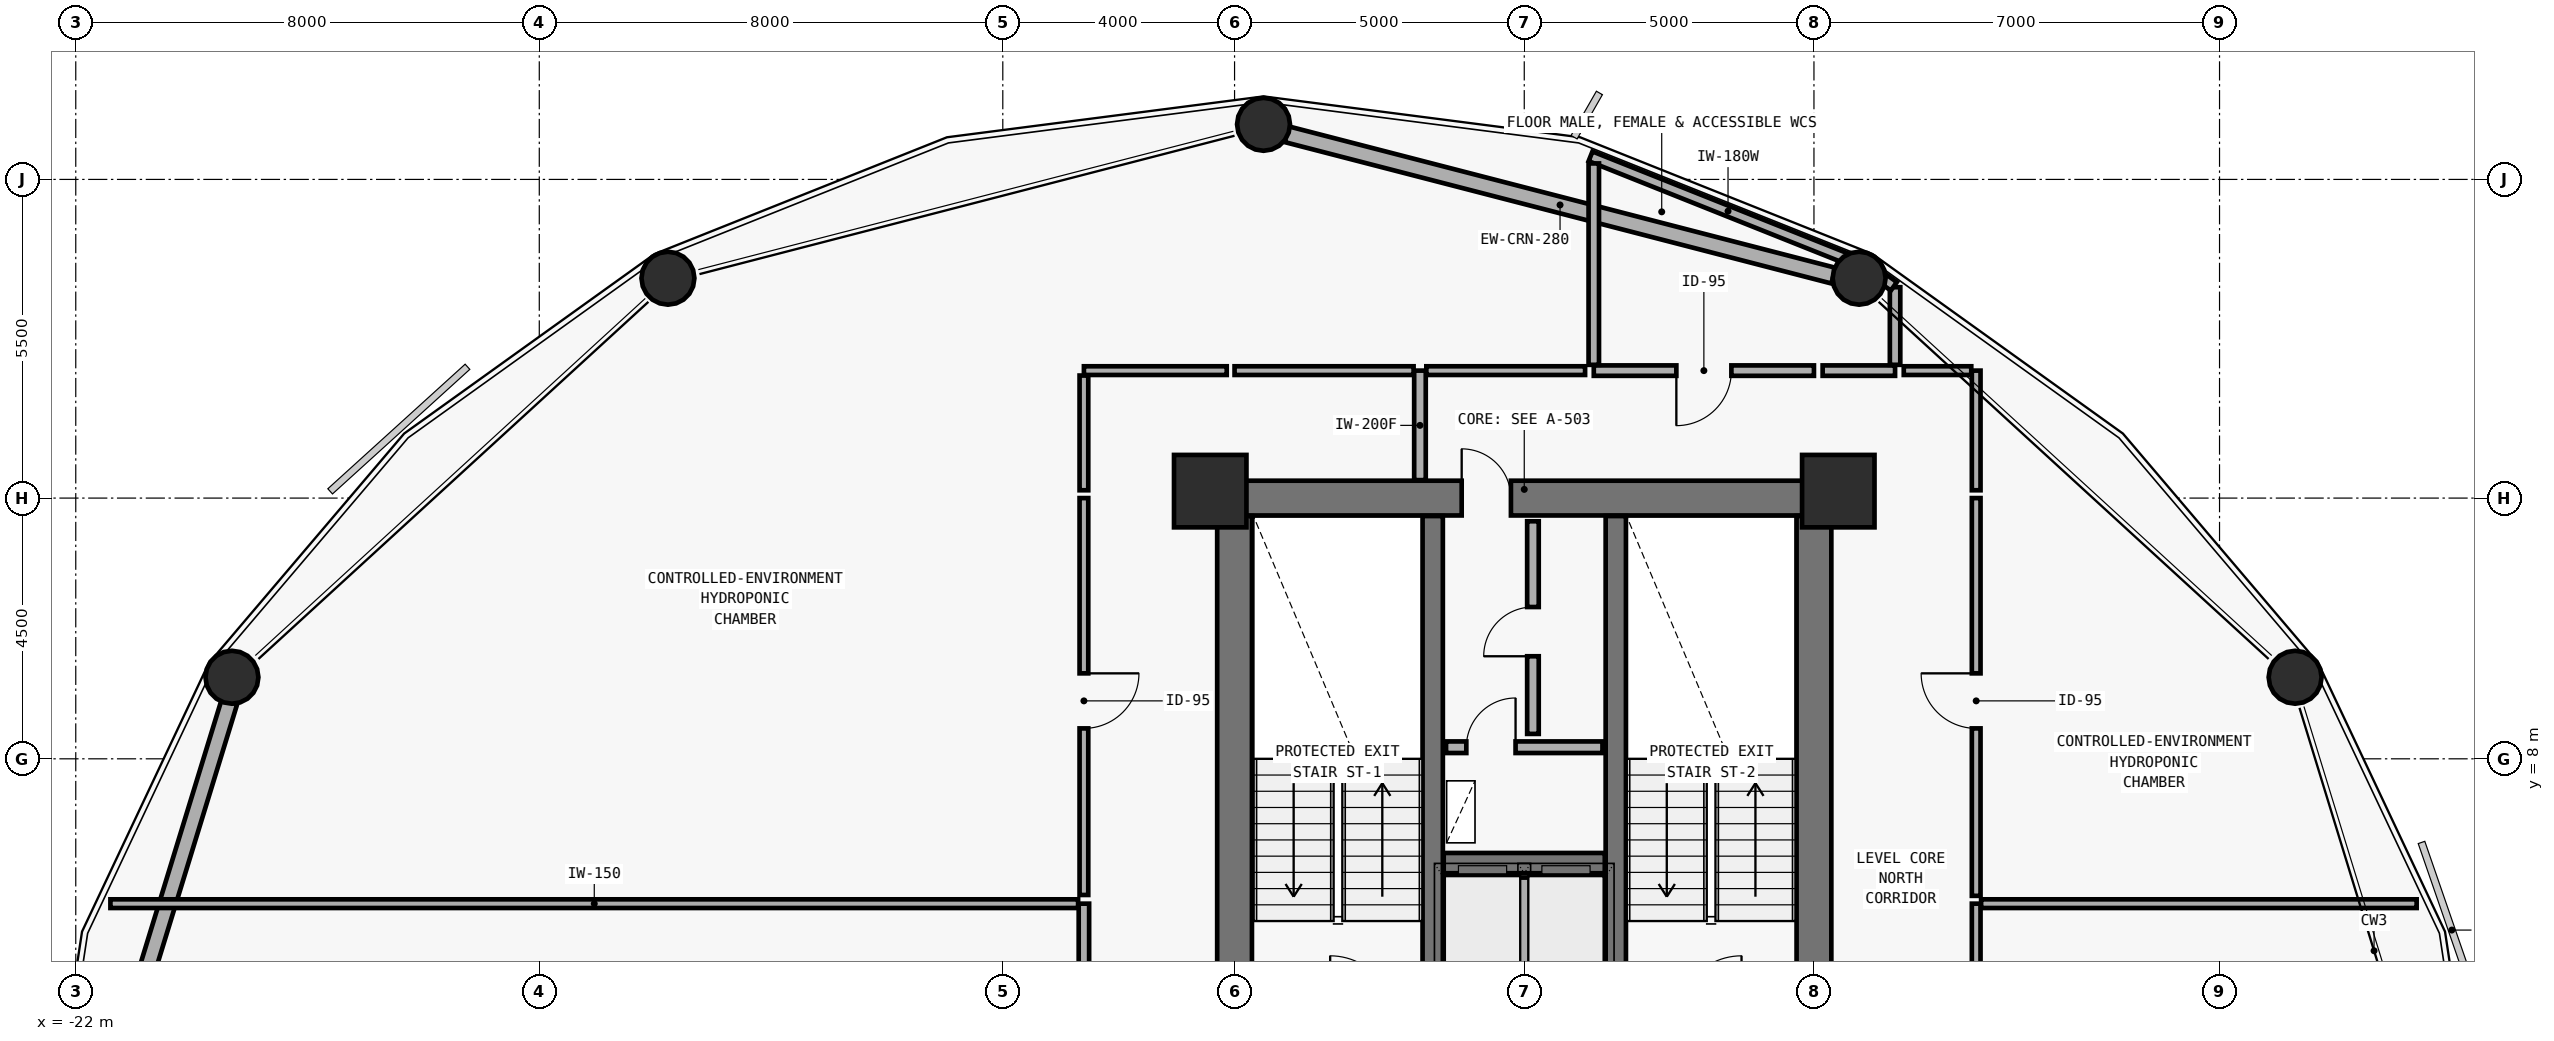
"""IFC4 building model, lengths in metres.
Left out: names, types, materials, properties, quantities, classifications, styles, units other than length and angle.
Written with IfcOpenShell. Run it as: python <this file> out.ifc"""

import sys

from ifc_helpers import new_model, si_unit, direction, frame, frame_2d, origin, origin_2d, place, context, subcontext, project, spatial, rectangle, hollow_circle, extrude, element, fill, save


model = new_model("IFC4")
c1 = context("Model", 3, precision=1e-05, world=origin(), true_north=direction((0.0, 1.0)))
c2 = subcontext(c1, "Body", "Model", "MODEL_VIEW")
j1 = project(units=[si_unit("LENGTHUNIT", "METRE"), si_unit("PLANEANGLEUNIT", "RADIAN")], contexts=[c1])
p1 = place(None, origin())
s1 = spatial("IfcSite", under=j1, at=p1, CompositionType="ELEMENT")
p2 = place(p1, origin())
s2 = spatial("IfcBuilding", under=s1, at=p2, CompositionType="ELEMENT")
p3 = place(p2, frame((0.0, 0.0, 39.3)))
s3 = spatial("IfcBuildingStorey", under=s2, at=p3, CompositionType="ELEMENT", Elevation=39.3)
p4 = place(p3, frame((-2.0, 12.5, 0.0), z_axis=(0.0, 0.0, 1.0), x_axis=(1.0, 0.0, 0.0)))
e1 = element("IfcWall", 1, at=p4, inside=s3, PredefinedType="SHEAR", context=c2, shape_type="SweptSolid", body=[
    extrude(rectangle(XDim=10.0, YDim=0.6, at=frame_2d((5.0, 0.0))), origin(), (0.0, 0.0, 1.0), 3.892),
])
p5 = place(p4, frame((3.92, 0.0, 0.0)))
e2 = element("IfcOpeningElement", 2, at=p5, cuts=e1, PredefinedType="OPENING", context=c2, shape_type="SweptSolid", body=[
    extrude(rectangle(XDim=0.85, YDim=2.1, at=frame_2d((0.425, 1.05))), frame((0.0, 0.31, 0.0), z_axis=(0.0, -1.0, 0.0), x_axis=(1.0, 0.0, 0.0)), (0.0, 0.0, 1.0), 0.62),
])
for number, where, z_axis, x_axis in (
    (3, (-2.0, 3.81, 0.0), (0.0, 0.0, 1.0), (0.0, 1.0, 0.0)),
    (4, (8.0, 3.81, 0.0), (0.0, 0.0, 1.0), (0.0, 1.0, 0.0)),
):
    element("IfcWall", number, at=place(p3, frame(where, z_axis=z_axis, x_axis=x_axis)), inside=s3, PredefinedType="SHEAR", context=c2, shape_type="SweptSolid", body=[
        extrude(rectangle(XDim=8.38, YDim=0.6, at=frame_2d((4.19, 0.0))), origin(), (0.0, 0.0, 1.0), 3.892),
    ])
for number, where, z_axis, x_axis in (
    (5, (1.42, 3.81, 0.0), (0.0, 0.0, 1.0), (0.0, 1.0, 0.0)),
    (6, (4.58, 3.81, 0.0), (0.0, 0.0, 1.0), (0.0, 1.0, 0.0)),
):
    element("IfcWall", number, at=place(p3, frame(where, z_axis=z_axis, x_axis=x_axis)), inside=s3, PredefinedType="SHEAR", context=c2, shape_type="SweptSolid", body=[
        extrude(rectangle(XDim=8.38, YDim=0.35, at=frame_2d((4.19, 0.0))), origin(), (0.0, 0.0, 1.0), 3.892),
    ])
p6 = place(p3, frame((1.61, 6.2, 0.0), z_axis=(0.0, 0.0, 1.0), x_axis=(1.0, 0.0, 0.0)))
e7 = element("IfcWall", 7, at=p6, inside=s3, PredefinedType="SHEAR", context=c2, shape_type="SweptSolid", body=[
    extrude(rectangle(XDim=2.78, YDim=0.35, at=frame_2d((1.39, 0.0))), origin(), (0.0, 0.0, 1.0), 3.892),
])
for number, where, z_axis, x_axis in (
    (8, (-2.42, 12.62, 0.0), (0.0, 0.0, 1.0), (1.0, 0.0, 0.0)),
    (9, (8.42, 12.62, 0.0), (0.0, 0.0, 1.0), (1.0, 0.0, 0.0)),
):
    element("IfcColumn", number, at=place(p3, frame(where, z_axis=z_axis, x_axis=x_axis)), inside=s3, PredefinedType="COLUMN", context=c2, shape_type="SweptSolid", body=[
        extrude(rectangle(XDim=1.25, YDim=1.25, at=origin_2d()), origin(), (0.0, 0.0, 1.0), 3.875),
    ])
p7 = place(p3, frame((16.229, 9.374, 0.0), z_axis=(0.039278153326, 0.017498920873, 0.999075079481), x_axis=(-0.406953237239, 0.913448992939, 0.0)))
e10 = element("IfcColumn", 10, at=p7, inside=s3, PredefinedType="COLUMN", context=c2, shape_type="SweptSolid", body=[
    extrude(hollow_circle(Radius=0.457, WallThickness=0.032, at=origin_2d()), origin(), (0.0, 0.0, 1.0), 3.879),
])
p8 = place(p3, frame((8.736, 16.236, 0.0), z_axis=(0.022665133029, 0.030409053481, 0.999280531788), x_axis=(-0.801789249334, 0.597606893913, 0.0)))
e11 = element("IfcColumn", 11, at=p8, inside=s3, PredefinedType="COLUMN", context=c2, shape_type="SweptSolid", body=[
    extrude(hollow_circle(Radius=0.457, WallThickness=0.032, at=origin_2d()), origin(), (0.0, 0.0, 1.0), 3.878),
])
p9 = place(p3, frame((-1.5, 18.883, 0.0), z_axis=(0.0, 0.03507165661, 0.999384800216), x_axis=(-1.0, 0.0, 0.0)))
e12 = element("IfcColumn", 12, at=p9, inside=s3, PredefinedType="COLUMN", context=c2, shape_type="SweptSolid", body=[
    extrude(hollow_circle(Radius=0.457, WallThickness=0.032, at=origin_2d()), origin(), (0.0, 0.0, 1.0), 3.877),
])
p10 = place(p3, frame((-11.736, 16.236, 0.0), z_axis=(-0.022665133029, 0.030409053481, 0.999280531788), x_axis=(-0.801789249334, -0.597606893913, 0.0)))
e13 = element("IfcColumn", 13, at=p10, inside=s3, PredefinedType="COLUMN", context=c2, shape_type="SweptSolid", body=[
    extrude(hollow_circle(Radius=0.457, WallThickness=0.032, at=origin_2d()), origin(), (0.0, 0.0, 1.0), 3.878),
])
p11 = place(p3, frame((-19.229, 9.374, 0.0), z_axis=(-0.039278153326, 0.017498920873, 0.999075079481), x_axis=(-0.406953237239, -0.913448992939, 0.0)))
e14 = element("IfcColumn", 14, at=p11, inside=s3, PredefinedType="COLUMN", context=c2, shape_type="SweptSolid", body=[
    extrude(hollow_circle(Radius=0.457, WallThickness=0.032, at=origin_2d()), origin(), (0.0, 0.0, 1.0), 3.879),
])
p12 = place(p3, frame((-1.101, 18.78, 0.0), z_axis=(0.0, 0.0, 1.0), x_axis=(0.968156017529, -0.250347609779, 0.0)))
e15 = element("IfcWall", 15, at=p12, inside=s3, PredefinedType="SOLIDWALL", context=c2, shape_type="SweptSolid", body=[
    extrude(rectangle(XDim=9.748, YDim=0.28, at=frame_2d((4.874, 0.0))), origin(), (0.0, 0.0, 1.0), 3.06),
])
p13 = place(p3, frame((-21.985, 0.394, 0.0), z_axis=(0.0, 0.0, 1.0), x_axis=(0.293459272164, 0.955971576764, 0.0)))
e16 = element("IfcWall", 16, at=p13, inside=s3, PredefinedType="SOLIDWALL", context=c2, shape_type="SweptSolid", body=[
    extrude(rectangle(XDim=8.982, YDim=0.28, at=frame_2d((4.491, 0.0))), origin(), (0.0, 0.0, 1.0), 3.06),
])
p14 = place(p3, frame((3.0, 3.92, 0.0), z_axis=(0.0, 0.0, 1.0), x_axis=(0.0, 1.0, 0.0)))
e17 = element("IfcWall", 17, at=p14, inside=s3, PredefinedType="SOLIDWALL", context=c2, shape_type="SweptSolid", body=[
    extrude(rectangle(XDim=2.03, YDim=0.2, at=frame_2d((1.015, 0.0))), origin(), (0.0, 0.0, 1.0), 3.64),
])
p15 = place(p3, frame((1.65, 8.2, 0.0), z_axis=(0.0, 0.0, 1.0), x_axis=(1.0, 0.0, 0.0)))
e18 = element("IfcWall", 18, at=p15, inside=s3, PredefinedType="MOVABLE", context=c2, shape_type="SweptSolid", body=[
    extrude(rectangle(XDim=2.7, YDim=0.2, at=frame_2d((1.35, 0.0))), origin(), (0.0, 0.0, 1.0), 3.64),
])
p16 = place(p15, frame((0.35, 0.0, 0.0)))
e19 = element("IfcOpeningElement", 19, at=p16, cuts=e18, PredefinedType="OPENING", context=c2, shape_type="SweptSolid", body=[
    extrude(rectangle(XDim=0.85, YDim=2.1, at=frame_2d((0.425, 1.05))), frame((0.0, 0.11, 0.0), z_axis=(0.0, -1.0, 0.0), x_axis=(1.0, 0.0, 0.0)), (0.0, 0.0, 1.0), 0.22),
])
p17 = place(p3, frame((3.15, 8.43, 0.0), z_axis=(0.0, 0.0, 1.0), x_axis=(0.0, 1.0, 0.0)))
e20 = element("IfcWall", 20, at=p17, inside=s3, PredefinedType="MOVABLE", context=c2, shape_type="SweptSolid", body=[
    extrude(rectangle(XDim=3.67, YDim=0.2, at=frame_2d((1.835, 0.0))), origin(), (0.0, 0.0, 1.0), 3.64),
])
p18 = place(p17, frame((1.34, 0.0, 0.0)))
e21 = element("IfcOpeningElement", 21, at=p18, cuts=e20, PredefinedType="OPENING", context=c2, shape_type="SweptSolid", body=[
    extrude(rectangle(XDim=0.85, YDim=2.1, at=frame_2d((0.425, 1.05))), frame((0.0, 0.11, 0.0), z_axis=(0.0, -1.0, 0.0), x_axis=(1.0, 0.0, 0.0)), (0.0, 0.0, 1.0), 0.22),
])
p19 = place(p3, frame((8.0, 14.7, 0.0), z_axis=(0.0, 0.0, 1.0), x_axis=(-1.0, 0.0, 0.0)))
e22 = element("IfcWall", 22, at=p19, inside=s3, PredefinedType="PLUMBINGWALL", context=c2, shape_type="SweptSolid", body=[
    extrude(rectangle(XDim=3.8, YDim=0.18, at=frame_2d((1.9, 0.0))), origin(), (0.0, 0.0, 1.0), 3.122),
])
p20 = place(p19, frame((1.425, 0.0, 0.0)))
e23 = element("IfcOpeningElement", 23, at=p20, cuts=e22, PredefinedType="OPENING", context=c2, shape_type="SweptSolid", body=[
    extrude(rectangle(XDim=0.95, YDim=2.1, at=frame_2d((0.475, 1.05))), frame((0.0, 0.1, 0.0), z_axis=(0.0, -1.0, 0.0), x_axis=(1.0, 0.0, 0.0)), (0.0, 0.0, 1.0), 0.2),
])
p21 = place(p3, frame((-4.6, 5.5, 0.0), z_axis=(0.0, 0.0, 1.0), x_axis=(0.0, -1.0, 0.0)))
e24 = element("IfcWall", 24, at=p21, inside=s3, PredefinedType="PLUMBINGWALL", context=c2, shape_type="SweptSolid", body=[
    extrude(rectangle(XDim=12.1, YDim=0.18, at=frame_2d((6.05, 0.0))), origin(), (0.0, 0.0, 1.0), 3.64),
])
p22 = place(p21, frame((5.575, 0.0, 0.0)))
e25 = element("IfcOpeningElement", 25, at=p22, cuts=e24, PredefinedType="OPENING", context=c2, shape_type="SweptSolid", body=[
    extrude(rectangle(XDim=0.95, YDim=2.1, at=frame_2d((0.475, 1.05))), frame((0.0, 0.1, 0.0), z_axis=(0.0, -1.0, 0.0), x_axis=(1.0, 0.0, 0.0)), (0.0, 0.0, 1.0), 0.2),
])
p23 = place(p3, frame((10.8, -1.69, 0.0), z_axis=(0.0, 0.0, 1.0), x_axis=(0.0, 1.0, 0.0)))
e26 = element("IfcWall", 26, at=p23, inside=s3, PredefinedType="PARTITIONING", context=c2, shape_type="SweptSolid", body=[
    extrude(rectangle(XDim=7.19, YDim=0.15, at=frame_2d((3.595, 0.0))), origin(), (0.0, 0.0, 1.0), 3.64),
])
p24 = place(p23, frame((3.065, 0.0, 0.0)))
e27 = element("IfcOpeningElement", 27, at=p24, cuts=e26, PredefinedType="OPENING", context=c2, shape_type="SweptSolid", body=[
    extrude(rectangle(XDim=0.95, YDim=2.1, at=frame_2d((0.475, 1.05))), frame((0.0, 0.085, 0.0), z_axis=(0.0, -1.0, 0.0), x_axis=(1.0, 0.0, 0.0)), (0.0, 0.0, 1.0), 0.17),
])
p25 = place(p3, frame((-4.6, 12.5, 0.0), z_axis=(0.0, 0.0, 1.0), x_axis=(0.0, -1.0, 0.0)))
e28 = element("IfcWall", 28, at=p25, inside=s3, PredefinedType="PARTITIONING", context=c2, shape_type="SweptSolid", body=[
    extrude(rectangle(XDim=6.85, YDim=0.15, at=frame_2d((3.425, 0.0))), origin(), (0.0, 0.0, 1.0), 3.64),
])
p26 = place(p25, frame((3.025, 0.0, 0.0)))
e29 = element("IfcOpeningElement", 29, at=p26, cuts=e28, PredefinedType="OPENING", context=c2, shape_type="SweptSolid", body=[
    extrude(rectangle(XDim=0.95, YDim=2.1, at=frame_2d((0.475, 1.05))), frame((0.0, 0.085, 0.0), z_axis=(0.0, -1.0, 0.0), x_axis=(1.0, 0.0, 0.0)), (0.0, 0.0, 1.0), 0.17),
])
p27 = place(p3, frame((10.8, 5.635, 0.0), z_axis=(0.0, 0.0, 1.0), x_axis=(0.0, 1.0, 0.0)))
e30 = element("IfcWall", 30, at=p27, inside=s3, PredefinedType="PARTITIONING", context=c2, shape_type="SweptSolid", body=[
    extrude(rectangle(XDim=6.865, YDim=0.15, at=frame_2d((3.433, 0.0))), origin(), (0.0, 0.0, 1.0), 3.64),
])
p28 = place(p27, frame((2.89, 0.0, 0.0)))
e31 = element("IfcOpeningElement", 31, at=p28, cuts=e30, PredefinedType="OPENING", context=c2, shape_type="SweptSolid", body=[
    extrude(rectangle(XDim=0.95, YDim=2.1, at=frame_2d((0.475, 1.05))), frame((0.0, 0.085, 0.0), z_axis=(0.0, -1.0, 0.0), x_axis=(1.0, 0.0, 0.0)), (0.0, 0.0, 1.0), 0.17),
])
p29 = place(p3, frame((1.2, 14.7, 0.0), z_axis=(0.0, 0.0, 1.0), x_axis=(0.0, -1.0, 0.0)))
e32 = element("IfcWall", 32, at=p29, inside=s3, PredefinedType="MOVABLE", context=c2, shape_type="SweptSolid", body=[
    extrude(rectangle(XDim=1.89, YDim=0.2, at=frame_2d((0.945, 0.0))), origin(), (0.0, 0.0, 1.0), 3.64),
])
p30 = place(p3, frame((9.4, 14.7, 0.0), z_axis=(0.0, 0.0, 1.0), x_axis=(-1.0, 0.0, 0.0)))
e33 = element("IfcWall", 33, at=p30, inside=s3, PredefinedType="PLUMBINGWALL", context=c2, shape_type="SweptSolid", body=[
    extrude(rectangle(XDim=1.25, YDim=0.18, at=frame_2d((0.625, 0.0))), origin(), (0.0, 0.0, 1.0), 3.122),
])
p31 = place(p3, frame((-21.402, 5.5, 0.0), z_axis=(0.0, 0.0, 1.0), x_axis=(1.0, 0.0, 0.0)))
e34 = element("IfcWall", 34, at=p31, inside=s3, PredefinedType="PARTITIONING", context=c2, shape_type="SweptSolid", body=[
    extrude(rectangle(XDim=16.702, YDim=0.15, at=frame_2d((8.351, 0.0))), origin(), (0.0, 0.0, 1.0), 3.64),
])
p32 = place(p3, frame((10.885, 5.5, 0.0), z_axis=(0.0, 0.0, 1.0), x_axis=(1.0, 0.0, 0.0)))
e35 = element("IfcWall", 35, at=p32, inside=s3, PredefinedType="PARTITIONING", context=c2, shape_type="SweptSolid", body=[
    extrude(rectangle(XDim=7.517, YDim=0.15, at=frame_2d((3.759, 0.0))), origin(), (0.0, 0.0, 1.0), 3.64),
])
p33 = place(p3, frame((1.09, 14.7, 0.0), z_axis=(0.0, 0.0, 1.0), x_axis=(-1.0, 0.0, 0.0)))
e36 = element("IfcWall", 36, at=p33, inside=s3, PredefinedType="PARTITIONING", context=c2, shape_type="SweptSolid", body=[
    extrude(rectangle(XDim=3.09, YDim=0.15, at=frame_2d((1.545, 0.0))), origin(), (0.0, 0.0, 1.0), 3.122),
])
p34 = place(p3, frame((-2.135, 14.7, 0.0), z_axis=(0.0, 0.0, 1.0), x_axis=(-1.0, 0.0, 0.0)))
e37 = element("IfcWall", 37, at=p34, inside=s3, PredefinedType="PARTITIONING", context=c2, shape_type="SweptSolid", body=[
    extrude(rectangle(XDim=2.465, YDim=0.15, at=frame_2d((1.232, 0.0))), origin(), (0.0, 0.0, 1.0), 3.122),
])
p35 = place(p3, frame((-4.6, 14.615, 0.0), z_axis=(0.0, 0.0, 1.0), x_axis=(0.0, -1.0, 0.0)))
e38 = element("IfcWall", 38, at=p35, inside=s3, PredefinedType="PARTITIONING", context=c2, shape_type="SweptSolid", body=[
    extrude(rectangle(XDim=1.98, YDim=0.15, at=frame_2d((0.99, 0.0))), origin(), (0.0, 0.0, 1.0), 3.64),
])
p36 = place(p3, frame((4.05, 14.7, 0.0), z_axis=(0.0, 0.0, 1.0), x_axis=(-1.0, 0.0, 0.0)))
e39 = element("IfcWall", 39, at=p36, inside=s3, PredefinedType="PARTITIONING", context=c2, shape_type="SweptSolid", body=[
    extrude(rectangle(XDim=2.74, YDim=0.15, at=frame_2d((1.37, 0.0))), origin(), (0.0, 0.0, 1.0), 3.122),
])
p37 = place(p3, frame((4.144, 18.399, 0.0), z_axis=(0.0, 0.0, 1.0), x_axis=(0.928766373998, -0.370665647897, 0.0)))
e40 = element("IfcWall", 40, at=p37, inside=s3, PredefinedType="PLUMBINGWALL", context=c2, shape_type="SweptSolid", body=[
    extrude(rectangle(XDim=5.11, YDim=0.18, at=frame_2d((2.555, 0.0))), origin(), (0.0, 0.0, 1.0), 3.072),
])
p38 = place(p3, frame((4.2, 18.276, 0.0), z_axis=(0.0, 0.0, 1.0), x_axis=(0.0, -1.0, 0.0)))
e41 = element("IfcWall", 41, at=p38, inside=s3, PredefinedType="PLUMBINGWALL", context=c2, shape_type="SweptSolid", body=[
    extrude(rectangle(XDim=3.476, YDim=0.18, at=frame_2d((1.738, 0.0))), origin(), (0.0, 0.0, 1.0), 3.64),
])
p39 = place(p3, frame((10.8, 12.635, 0.0), z_axis=(0.0, 0.0, 1.0), x_axis=(0.0, 1.0, 0.0)))
e42 = element("IfcWall", 42, at=p39, inside=s3, PredefinedType="PARTITIONING", context=c2, shape_type="SweptSolid", body=[
    extrude(rectangle(XDim=2.065, YDim=0.15, at=frame_2d((1.032, 0.0))), origin(), (0.0, 0.0, 1.0), 3.64),
])
p40 = place(p3, frame((10.715, 14.7, 0.0), z_axis=(0.0, 0.0, 1.0), x_axis=(-1.0, 0.0, 0.0)))
e43 = element("IfcWall", 43, at=p40, inside=s3, PredefinedType="PARTITIONING", context=c2, shape_type="SweptSolid", body=[
    extrude(rectangle(XDim=1.165, YDim=0.15, at=frame_2d((0.583, 0.0))), origin(), (0.0, 0.0, 1.0), 3.64),
])
p41 = place(p3, frame((9.4, 14.8, 0.0), z_axis=(0.0, 0.0, 1.0), x_axis=(0.0, 1.0, 0.0)))
e44 = element("IfcWall", 44, at=p41, inside=s3, PredefinedType="PLUMBINGWALL", context=c2, shape_type="SweptSolid", body=[
    extrude(rectangle(XDim=1.34, YDim=0.18, at=frame_2d((0.67, 0.0))), origin(), (0.0, 0.0, 1.0), 2.972),
])
p42 = place(p3, frame((8.971, 16.447, 0.0), z_axis=(0.0, 0.0, 1.0), x_axis=(0.813174117439, -0.582020493391, 0.0)))
e45 = element("IfcWall", 45, at=p42, inside=s3, PredefinedType="PLUMBINGWALL", context=c2, shape_type="SweptSolid", body=[
    extrude(rectangle(XDim=0.502, YDim=0.18, at=frame_2d((0.251, 0.0))), origin(), (0.0, 0.0, 1.0), 3.072),
])
p43 = place(p5, origin())
e46 = element("IfcDoor", 46, at=p43, inside=s3, OperationType="SINGLE_SWING_LEFT", PredefinedType="DOOR", context=c2, shape_type="SweptSolid", body=[
    extrude(rectangle(XDim=0.85, YDim=2.1, at=frame_2d((0.425, 1.05))), frame((0.0, 0.025, 0.0), z_axis=(0.0, -1.0, 0.0), x_axis=(1.0, 0.0, 0.0)), (0.0, 0.0, 1.0), 0.05),
])
fill(e2, e46)
p44 = place(p16, origin())
e47 = element("IfcDoor", 47, at=p44, inside=s3, OperationType="SINGLE_SWING_RIGHT", PredefinedType="DOOR", context=c2, shape_type="SweptSolid", body=[
    extrude(rectangle(XDim=0.85, YDim=2.1, at=frame_2d((0.425, 1.05))), frame((0.0, 0.025, 0.0), z_axis=(0.0, -1.0, 0.0), x_axis=(1.0, 0.0, 0.0)), (0.0, 0.0, 1.0), 0.05),
])
fill(e19, e47)
p45 = place(p18, origin())
e48 = element("IfcDoor", 48, at=p45, inside=s3, OperationType="SINGLE_SWING_LEFT", PredefinedType="DOOR", context=c2, shape_type="SweptSolid", body=[
    extrude(rectangle(XDim=0.85, YDim=2.1, at=frame_2d((0.425, 1.05))), frame((0.0, 0.025, 0.0), z_axis=(0.0, -1.0, 0.0), x_axis=(1.0, 0.0, 0.0)), (0.0, 0.0, 1.0), 0.05),
])
fill(e21, e48)
p46 = place(p20, origin())
e49 = element("IfcDoor", 49, at=p46, inside=s3, OperationType="SINGLE_SWING_RIGHT", PredefinedType="DOOR", context=c2, shape_type="SweptSolid", body=[
    extrude(rectangle(XDim=0.95, YDim=2.1, at=frame_2d((0.475, 1.05))), frame((0.0, 0.025, 0.0), z_axis=(0.0, -1.0, 0.0), x_axis=(1.0, 0.0, 0.0)), (0.0, 0.0, 1.0), 0.05),
])
fill(e23, e49)
p47 = place(p26, origin())
e50 = element("IfcDoor", 50, at=p47, inside=s3, OperationType="SINGLE_SWING_LEFT", PredefinedType="DOOR", context=c2, shape_type="SweptSolid", body=[
    extrude(rectangle(XDim=0.95, YDim=2.1, at=frame_2d((0.475, 1.05))), frame((0.0, 0.025, 0.0), z_axis=(0.0, -1.0, 0.0), x_axis=(1.0, 0.0, 0.0)), (0.0, 0.0, 1.0), 0.05),
])
fill(e29, e50)
p48 = place(p28, origin())
e51 = element("IfcDoor", 51, at=p48, inside=s3, OperationType="SINGLE_SWING_RIGHT", PredefinedType="DOOR", context=c2, shape_type="SweptSolid", body=[
    extrude(rectangle(XDim=0.95, YDim=2.1, at=frame_2d((0.475, 1.05))), frame((0.0, 0.025, 0.0), z_axis=(0.0, -1.0, 0.0), x_axis=(1.0, 0.0, 0.0)), (0.0, 0.0, 1.0), 0.05),
])
fill(e31, e51)
save(model, sys.argv[1])
